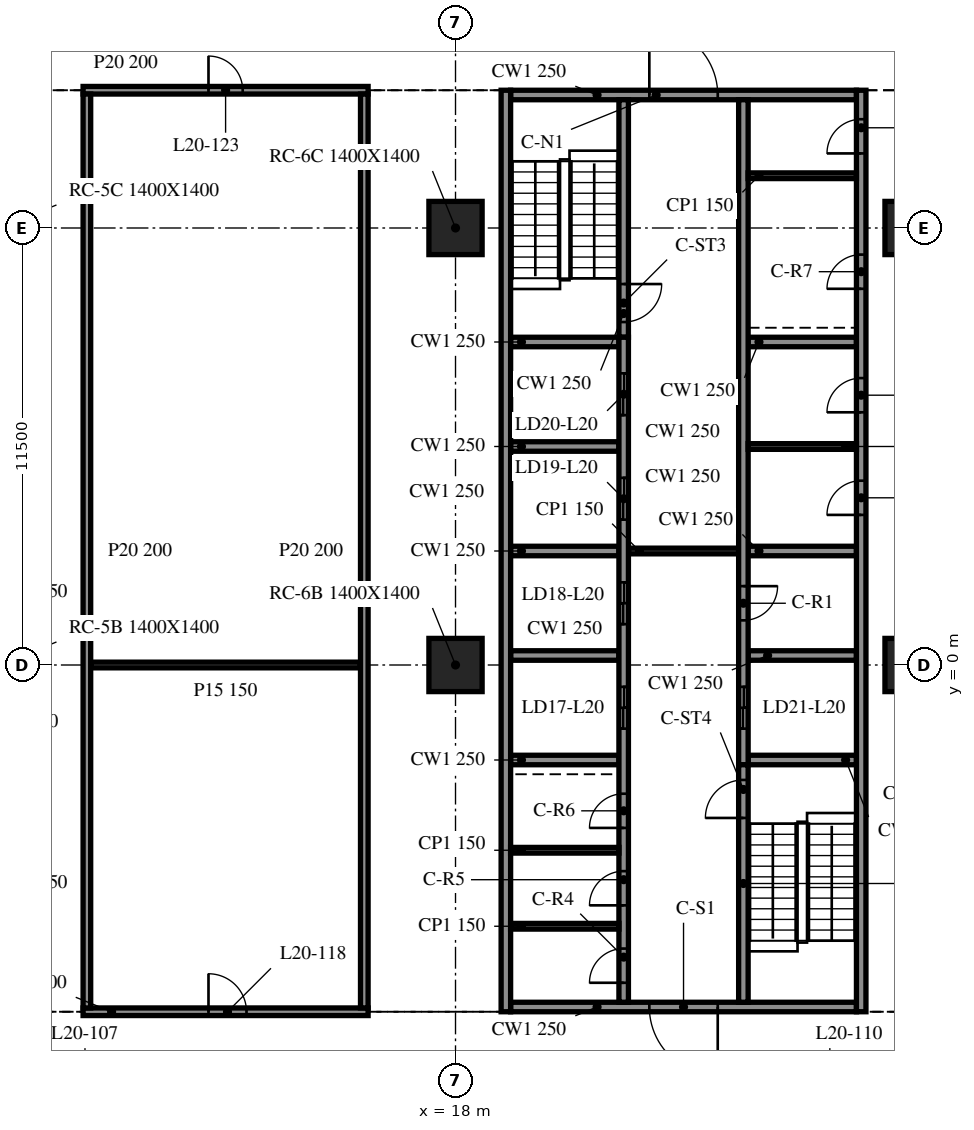
"""IFC4 building model, lengths in metres.
Left out: names, types, materials, properties, quantities, classifications, styles, units other than length and angle.
Written with IfcOpenShell. Run it as: python <this file> out.ifc"""

import sys

from ifc_helpers import new_model, si_unit, direction, frame, frame_2d, origin, origin_2d, place, context, subcontext, project, spatial, rectangle, extrude, element, fill, save


model = new_model("IFC4")
c1 = context("Model", 3, precision=1e-05, world=origin(), true_north=direction((0.0, 1.0)))
c2 = subcontext(c1, "Body", "Model", "MODEL_VIEW")
j1 = project(units=[si_unit("LENGTHUNIT", "METRE"), si_unit("PLANEANGLEUNIT", "RADIAN")], contexts=[c1])
p1 = place(None, origin())
s1 = spatial("IfcSite", under=j1, at=p1, CompositionType="ELEMENT")
p2 = place(p1, origin())
s2 = spatial("IfcBuilding", under=s1, at=p2, CompositionType="ELEMENT")
p3 = place(p2, frame((0.0, 0.0, 88.9)))
s3 = spatial("IfcBuildingStorey", under=s2, at=p3, CompositionType="ELEMENT", Elevation=88.9)
for number, where, z_axis, x_axis in (
    (1, (18.0, 0.0, -0.34), (0.0, 0.0, 1.0), (1.0, 0.0, 0.0)),
    (2, (18.0, 11.5, -0.34), (0.0, 0.0, 1.0), (1.0, 0.0, 0.0)),
    (3, (30.0, 0.0, -0.34), (0.0, 0.0, 1.0), (1.0, 0.0, 0.0)),
    (4, (30.0, 11.5, -0.34), (0.0, 0.0, 1.0), (1.0, 0.0, 0.0)),
):
    element("IfcColumn", number, at=place(p3, frame(where, z_axis=z_axis, x_axis=x_axis)), inside=s3, PredefinedType="COLUMN", context=c2, shape_type="SweptSolid", body=[
        extrude(rectangle(XDim=1.4, YDim=1.4, at=origin_2d()), origin(), (0.0, 0.0, 1.0), 4.1),
    ])
p4 = place(p3, frame((19.325, 15.125, 0.0), z_axis=(0.0, 0.0, 1.0), x_axis=(0.0, -1.0, 0.0)))
e5 = element("IfcWall", 5, at=p4, inside=s3, PredefinedType="SOLIDWALL", context=c2, shape_type="SweptSolid", body=[
    extrude(rectangle(XDim=24.25, YDim=0.25, at=frame_2d((12.125, 0.0))), origin(), (0.0, 0.0, 1.0), 3.76),
])
p5 = place(p3, frame((28.675, -9.125, 0.0), z_axis=(0.0, 0.0, 1.0), x_axis=(0.0, 1.0, 0.0)))
e6 = element("IfcWall", 6, at=p5, inside=s3, PredefinedType="SOLIDWALL", context=c2, shape_type="SweptSolid", body=[
    extrude(rectangle(XDim=24.25, YDim=0.25, at=frame_2d((12.125, 0.0))), origin(), (0.0, 0.0, 1.0), 3.76),
])
p6 = place(p5, frame((13.075, 0.0, 0.0)))
e7 = element("IfcOpeningElement", 7, at=p6, cuts=e6, PredefinedType="OPENING", context=c2, shape_type="SweptSolid", body=[
    extrude(rectangle(XDim=0.9, YDim=2.1, at=frame_2d((0.45, 1.05))), frame((0.0, 0.135, 0.0), z_axis=(0.0, -1.0, 0.0), x_axis=(1.0, 0.0, 0.0)), (0.0, 0.0, 1.0), 0.27),
])
p7 = place(p5, frame((15.775, 0.0, 0.0)))
e8 = element("IfcOpeningElement", 8, at=p7, cuts=e6, PredefinedType="OPENING", context=c2, shape_type="SweptSolid", body=[
    extrude(rectangle(XDim=0.9, YDim=2.1, at=frame_2d((0.45, 1.05))), frame((0.0, 0.135, 0.0), z_axis=(0.0, -1.0, 0.0), x_axis=(1.0, 0.0, 0.0)), (0.0, 0.0, 1.0), 0.27),
])
p8 = place(p5, frame((19.025, 0.0, 0.0)))
e9 = element("IfcOpeningElement", 9, at=p8, cuts=e6, PredefinedType="OPENING", context=c2, shape_type="SweptSolid", body=[
    extrude(rectangle(XDim=0.9, YDim=2.1, at=frame_2d((0.45, 1.05))), frame((0.0, 0.135, 0.0), z_axis=(0.0, -1.0, 0.0), x_axis=(1.0, 0.0, 0.0)), (0.0, 0.0, 1.0), 0.27),
])
p9 = place(p5, frame((22.587, 0.0, 0.0)))
e10 = element("IfcOpeningElement", 10, at=p9, cuts=e6, PredefinedType="OPENING", context=c2, shape_type="SweptSolid", body=[
    extrude(rectangle(XDim=0.9, YDim=2.1, at=frame_2d((0.45, 1.05))), frame((0.0, 0.135, 0.0), z_axis=(0.0, -1.0, 0.0), x_axis=(1.0, 0.0, 0.0)), (0.0, 0.0, 1.0), 0.27),
])
p10 = place(p3, frame((28.55, -9.0, 0.0), z_axis=(0.0, 0.0, 1.0), x_axis=(-1.0, 0.0, 0.0)))
e11 = element("IfcWall", 11, at=p10, inside=s3, PredefinedType="SOLIDWALL", context=c2, shape_type="SweptSolid", body=[
    extrude(rectangle(XDim=9.1, YDim=0.25, at=frame_2d((4.55, 0.0))), origin(), (0.0, 0.0, 1.0), 3.76),
])
p11 = place(p10, frame((3.65, 0.0, 0.0)))
e12 = element("IfcOpeningElement", 12, at=p11, cuts=e11, PredefinedType="OPENING", context=c2, shape_type="SweptSolid", body=[
    extrude(rectangle(XDim=1.8, YDim=2.1, at=frame_2d((0.9, 1.05))), frame((0.0, 0.135, 0.0), z_axis=(0.0, -1.0, 0.0), x_axis=(1.0, 0.0, 0.0)), (0.0, 0.0, 1.0), 0.27),
])
p12 = place(p3, frame((19.45, 15.0, 0.0), z_axis=(0.0, 0.0, 1.0), x_axis=(1.0, 0.0, 0.0)))
e13 = element("IfcWall", 13, at=p12, inside=s3, PredefinedType="SOLIDWALL", context=c2, shape_type="SweptSolid", body=[
    extrude(rectangle(XDim=9.1, YDim=0.25, at=frame_2d((4.55, 0.0))), origin(), (0.0, 0.0, 1.0), 3.76),
])
p13 = place(p12, frame((3.65, 0.0, 0.0)))
e14 = element("IfcOpeningElement", 14, at=p13, cuts=e13, PredefinedType="OPENING", context=c2, shape_type="SweptSolid", body=[
    extrude(rectangle(XDim=1.8, YDim=2.1, at=frame_2d((0.9, 1.05))), frame((0.0, 0.135, 0.0), z_axis=(0.0, -1.0, 0.0), x_axis=(1.0, 0.0, 0.0)), (0.0, 0.0, 1.0), 0.27),
])
p14 = place(p3, frame((22.425, -8.875, 0.0), z_axis=(0.0, 0.0, 1.0), x_axis=(0.0, 1.0, 0.0)))
e15 = element("IfcWall", 15, at=p14, inside=s3, PredefinedType="SOLIDWALL", context=c2, shape_type="SweptSolid", body=[
    extrude(rectangle(XDim=17.5, YDim=0.25, at=frame_2d((8.75, 0.0))), origin(), (0.0, 0.0, 1.0), 3.76),
])
p15 = place(p14, frame((7.2, 0.0, 0.0)))
e16 = element("IfcOpeningElement", 16, at=p15, cuts=e15, PredefinedType="OPENING", context=c2, shape_type="SweptSolid", body=[
    extrude(rectangle(XDim=1.1, YDim=2.1, at=frame_2d((0.55, 1.05))), frame((0.0, 0.135, 0.0), z_axis=(0.0, -1.0, 0.0), x_axis=(1.0, 0.0, 0.0)), (0.0, 0.0, 1.0), 0.27),
])
p16 = place(p14, frame((9.95, 0.0, 0.0)))
e17 = element("IfcOpeningElement", 17, at=p16, cuts=e15, PredefinedType="OPENING", context=c2, shape_type="SweptSolid", body=[
    extrude(rectangle(XDim=1.1, YDim=2.1, at=frame_2d((0.55, 1.05))), frame((0.0, 0.135, 0.0), z_axis=(0.0, -1.0, 0.0), x_axis=(1.0, 0.0, 0.0)), (0.0, 0.0, 1.0), 0.27),
])
p17 = place(p14, frame((12.7, 0.0, 0.0)))
e18 = element("IfcOpeningElement", 18, at=p17, cuts=e15, PredefinedType="OPENING", context=c2, shape_type="SweptSolid", body=[
    extrude(rectangle(XDim=1.1, YDim=2.1, at=frame_2d((0.55, 1.05))), frame((0.0, 0.135, 0.0), z_axis=(0.0, -1.0, 0.0), x_axis=(1.0, 0.0, 0.0)), (0.0, 0.0, 1.0), 0.27),
])
p18 = place(p14, frame((15.45, 0.0, 0.0)))
e19 = element("IfcOpeningElement", 19, at=p18, cuts=e15, PredefinedType="OPENING", context=c2, shape_type="SweptSolid", body=[
    extrude(rectangle(XDim=1.1, YDim=2.1, at=frame_2d((0.55, 1.05))), frame((0.0, 0.135, 0.0), z_axis=(0.0, -1.0, 0.0), x_axis=(1.0, 0.0, 0.0)), (0.0, 0.0, 1.0), 0.27),
])
p19 = place(p14, frame((0.512, 0.0, 0.0)))
e20 = element("IfcOpeningElement", 20, at=p19, cuts=e15, PredefinedType="OPENING", context=c2, shape_type="SweptSolid", body=[
    extrude(rectangle(XDim=0.9, YDim=2.1, at=frame_2d((0.45, 1.05))), frame((0.0, 0.135, 0.0), z_axis=(0.0, -1.0, 0.0), x_axis=(1.0, 0.0, 0.0)), (0.0, 0.0, 1.0), 0.27),
])
p20 = place(p14, frame((2.55, 0.0, 0.0)))
e21 = element("IfcOpeningElement", 21, at=p20, cuts=e15, PredefinedType="OPENING", context=c2, shape_type="SweptSolid", body=[
    extrude(rectangle(XDim=0.9, YDim=2.1, at=frame_2d((0.45, 1.05))), frame((0.0, 0.135, 0.0), z_axis=(0.0, -1.0, 0.0), x_axis=(1.0, 0.0, 0.0)), (0.0, 0.0, 1.0), 0.27),
])
p21 = place(p14, frame((4.587, 0.0, 0.0)))
e22 = element("IfcOpeningElement", 22, at=p21, cuts=e15, PredefinedType="OPENING", context=c2, shape_type="SweptSolid", body=[
    extrude(rectangle(XDim=0.9, YDim=2.1, at=frame_2d((0.45, 1.05))), frame((0.0, 0.135, 0.0), z_axis=(0.0, -1.0, 0.0), x_axis=(1.0, 0.0, 0.0)), (0.0, 0.0, 1.0), 0.27),
])
p22 = place(p3, frame((22.425, 14.875, 0.0), z_axis=(0.0, 0.0, 1.0), x_axis=(0.0, -1.0, 0.0)))
e23 = element("IfcWall", 23, at=p22, inside=s3, PredefinedType="SOLIDWALL", context=c2, shape_type="SweptSolid", body=[
    extrude(rectangle(XDim=6.25, YDim=0.25, at=frame_2d((3.125, 0.0))), origin(), (0.0, 0.0, 1.0), 3.76),
])
p23 = place(p22, frame((4.85, 0.0, 0.0)))
e24 = element("IfcOpeningElement", 24, at=p23, cuts=e23, PredefinedType="OPENING", context=c2, shape_type="SweptSolid", body=[
    extrude(rectangle(XDim=1.0, YDim=2.1, at=frame_2d((0.5, 1.05))), frame((0.0, 0.135, 0.0), z_axis=(0.0, -1.0, 0.0), x_axis=(1.0, 0.0, 0.0)), (0.0, 0.0, 1.0), 0.27),
])
p24 = place(p3, frame((25.575, -8.875, 0.0), z_axis=(0.0, 0.0, 1.0), x_axis=(0.0, 1.0, 0.0)))
e25 = element("IfcWall", 25, at=p24, inside=s3, PredefinedType="SOLIDWALL", context=c2, shape_type="SweptSolid", body=[
    extrude(rectangle(XDim=6.25, YDim=0.25, at=frame_2d((3.125, 0.0))), origin(), (0.0, 0.0, 1.0), 3.76),
])
p25 = place(p24, frame((4.85, 0.0, 0.0)))
e26 = element("IfcOpeningElement", 26, at=p25, cuts=e25, PredefinedType="OPENING", context=c2, shape_type="SweptSolid", body=[
    extrude(rectangle(XDim=1.0, YDim=2.1, at=frame_2d((0.5, 1.05))), frame((0.0, 0.135, 0.0), z_axis=(0.0, -1.0, 0.0), x_axis=(1.0, 0.0, 0.0)), (0.0, 0.0, 1.0), 0.27),
])
p26 = place(p3, frame((25.575, 14.875, 0.0), z_axis=(0.0, 0.0, 1.0), x_axis=(0.0, -1.0, 0.0)))
e27 = element("IfcWall", 27, at=p26, inside=s3, PredefinedType="SOLIDWALL", context=c2, shape_type="SweptSolid", body=[
    extrude(rectangle(XDim=17.5, YDim=0.25, at=frame_2d((8.75, 0.0))), origin(), (0.0, 0.0, 1.0), 3.76),
])
p27 = place(p26, frame((15.45, 0.0, 0.0)))
e28 = element("IfcOpeningElement", 28, at=p27, cuts=e27, PredefinedType="OPENING", context=c2, shape_type="SweptSolid", body=[
    extrude(rectangle(XDim=1.1, YDim=2.1, at=frame_2d((0.55, 1.05))), frame((0.0, 0.135, 0.0), z_axis=(0.0, -1.0, 0.0), x_axis=(1.0, 0.0, 0.0)), (0.0, 0.0, 1.0), 0.27),
])
p28 = place(p26, frame((12.8, 0.0, 0.0)))
e29 = element("IfcOpeningElement", 29, at=p28, cuts=e27, PredefinedType="OPENING", context=c2, shape_type="SweptSolid", body=[
    extrude(rectangle(XDim=0.9, YDim=2.1, at=frame_2d((0.45, 1.05))), frame((0.0, 0.135, 0.0), z_axis=(0.0, -1.0, 0.0), x_axis=(1.0, 0.0, 0.0)), (0.0, 0.0, 1.0), 0.27),
])
for number, where, z_axis, x_axis in (
    (30, (19.45, -2.5, 0.0), (0.0, 0.0, 1.0), (1.0, 0.0, 0.0)),
    (31, (19.45, 0.25, 0.0), (0.0, 0.0, 1.0), (1.0, 0.0, 0.0)),
    (32, (19.45, 3.0, 0.0), (0.0, 0.0, 1.0), (1.0, 0.0, 0.0)),
    (33, (19.45, 5.75, 0.0), (0.0, 0.0, 1.0), (1.0, 0.0, 0.0)),
    (34, (19.45, 8.5, 0.0), (0.0, 0.0, 1.0), (1.0, 0.0, 0.0)),
    (35, (25.7, -2.5, 0.0), (0.0, 0.0, 1.0), (1.0, 0.0, 0.0)),
    (36, (25.7, 0.25, 0.0), (0.0, 0.0, 1.0), (1.0, 0.0, 0.0)),
    (37, (25.7, 3.0, 0.0), (0.0, 0.0, 1.0), (1.0, 0.0, 0.0)),
    (38, (25.7, 8.5, 0.0), (0.0, 0.0, 1.0), (1.0, 0.0, 0.0)),
):
    element("IfcWall", number, at=place(p3, frame(where, z_axis=z_axis, x_axis=x_axis)), inside=s3, PredefinedType="SOLIDWALL", context=c2, shape_type="SweptSolid", body=[
        extrude(rectangle(XDim=2.85, YDim=0.25, at=frame_2d((1.425, 0.0))), origin(), (0.0, 0.0, 1.0), 3.76),
    ])
p29 = place(p3, frame((22.55, 3.0, 0.0), z_axis=(0.0, 0.0, 1.0), x_axis=(1.0, 0.0, 0.0)))
e39 = element("IfcWall", 39, at=p29, inside=s3, PredefinedType="PARTITIONING", context=c2, shape_type="SweptSolid", body=[
    extrude(rectangle(XDim=2.9, YDim=0.15, at=frame_2d((1.45, 0.0))), origin(), (0.0, 0.0, 1.0), 3.76),
])
for number, where, z_axis, x_axis in (
    (40, (25.7, 5.75, 0.0), (0.0, 0.0, 1.0), (1.0, 0.0, 0.0)),
    (41, (19.45, -6.875, 0.0), (0.0, 0.0, 1.0), (1.0, 0.0, 0.0)),
    (42, (19.45, -4.875, 0.0), (0.0, 0.0, 1.0), (1.0, 0.0, 0.0)),
    (43, (25.7, 12.875, 0.0), (0.0, 0.0, 1.0), (1.0, 0.0, 0.0)),
):
    element("IfcWall", number, at=place(p3, frame(where, z_axis=z_axis, x_axis=x_axis)), inside=s3, PredefinedType="PARTITIONING", context=c2, shape_type="SweptSolid", body=[
        extrude(rectangle(XDim=2.85, YDim=0.15, at=frame_2d((1.425, 0.0))), origin(), (0.0, 0.0, 1.0), 3.76),
    ])
p30 = place(p3, frame((8.2, -9.125, 0.0), z_axis=(0.0, 0.0, 1.0), x_axis=(1.0, 0.0, 0.0)))
e44 = element("IfcWall", 44, at=p30, inside=s3, PredefinedType="PARTITIONING", context=c2, shape_type="SweptSolid", body=[
    extrude(rectangle(XDim=7.5, YDim=0.2, at=frame_2d((3.75, 0.0))), origin(), (0.0, 0.0, 1.0), 3.76),
])
p31 = place(p30, frame((3.3, 0.0, 0.0)))
e45 = element("IfcOpeningElement", 45, at=p31, cuts=e44, PredefinedType="OPENING", context=c2, shape_type="SweptSolid", body=[
    extrude(rectangle(XDim=1.0, YDim=2.1, at=frame_2d((0.5, 1.05))), frame((0.0, 0.11, 0.0), z_axis=(0.0, -1.0, 0.0), x_axis=(1.0, 0.0, 0.0)), (0.0, 0.0, 1.0), 0.22),
])
p32 = place(p3, frame((8.4, 0.0, 0.0), z_axis=(0.0, 0.0, 1.0), x_axis=(1.0, 0.0, 0.0)))
e46 = element("IfcWall", 46, at=p32, inside=s3, PredefinedType="PARTITIONING", context=c2, shape_type="SweptSolid", body=[
    extrude(rectangle(XDim=7.1, YDim=0.15, at=frame_2d((3.55, 0.0))), origin(), (0.0, 0.0, 1.0), 3.76),
])
p33 = place(p3, frame((8.2, 15.125, 0.0), z_axis=(0.0, 0.0, 1.0), x_axis=(1.0, 0.0, 0.0)))
e47 = element("IfcWall", 47, at=p33, inside=s3, PredefinedType="PARTITIONING", context=c2, shape_type="SweptSolid", body=[
    extrude(rectangle(XDim=7.5, YDim=0.2, at=frame_2d((3.75, 0.0))), origin(), (0.0, 0.0, 1.0), 3.76),
])
p34 = place(p33, frame((3.3, 0.0, 0.0)))
e48 = element("IfcOpeningElement", 48, at=p34, cuts=e47, PredefinedType="OPENING", context=c2, shape_type="SweptSolid", body=[
    extrude(rectangle(XDim=0.9, YDim=2.1, at=frame_2d((0.45, 1.05))), frame((0.0, 0.11, 0.0), z_axis=(0.0, -1.0, 0.0), x_axis=(1.0, 0.0, 0.0)), (0.0, 0.0, 1.0), 0.22),
])
for number, where, z_axis, x_axis in (
    (49, (8.3, -9.025, 0.0), (0.0, 0.0, 1.0), (0.0, 1.0, 0.0)),
    (50, (15.6, -9.025, 0.0), (0.0, 0.0, 1.0), (0.0, 1.0, 0.0)),
):
    element("IfcWall", number, at=place(p3, frame(where, z_axis=z_axis, x_axis=x_axis)), inside=s3, PredefinedType="PARTITIONING", context=c2, shape_type="SweptSolid", body=[
        extrude(rectangle(XDim=24.05, YDim=0.2, at=frame_2d((12.025, 0.0))), origin(), (0.0, 0.0, 1.0), 3.76),
    ])
p35 = place(p11, origin())
e51 = element("IfcDoor", 51, at=p35, inside=s3, OperationType="DOUBLE_DOOR_SINGLE_SWING", PredefinedType="DOOR", context=c2, shape_type="SweptSolid", body=[
    extrude(rectangle(XDim=1.8, YDim=2.1, at=frame_2d((0.9, 1.05))), frame((0.0, 0.025, 0.0), z_axis=(0.0, -1.0, 0.0), x_axis=(1.0, 0.0, 0.0)), (0.0, 0.0, 1.0), 0.05),
])
fill(e12, e51)
p36 = place(p13, origin())
e52 = element("IfcDoor", 52, at=p36, inside=s3, OperationType="DOUBLE_DOOR_SINGLE_SWING", PredefinedType="DOOR", context=c2, shape_type="SweptSolid", body=[
    extrude(rectangle(XDim=1.8, YDim=2.1, at=frame_2d((0.9, 1.05))), frame((0.0, 0.025, 0.0), z_axis=(0.0, -1.0, 0.0), x_axis=(1.0, 0.0, 0.0)), (0.0, 0.0, 1.0), 0.05),
])
fill(e14, e52)
p37 = place(p27, origin())
e53 = element("IfcDoor", 53, at=p37, inside=s3, OperationType="DOUBLE_DOOR_SLIDING", PredefinedType="DOOR", context=c2, shape_type="SweptSolid", body=[
    extrude(rectangle(XDim=1.1, YDim=2.1, at=frame_2d((0.55, 1.05))), frame((0.0, 0.025, 0.0), z_axis=(0.0, -1.0, 0.0), x_axis=(1.0, 0.0, 0.0)), (0.0, 0.0, 1.0), 0.05),
])
fill(e28, e53)
p38 = place(p15, origin())
e54 = element("IfcDoor", 54, at=p38, inside=s3, OperationType="DOUBLE_DOOR_SLIDING", PredefinedType="DOOR", context=c2, shape_type="SweptSolid", body=[
    extrude(rectangle(XDim=1.1, YDim=2.1, at=frame_2d((0.55, 1.05))), frame((0.0, 0.025, 0.0), z_axis=(0.0, -1.0, 0.0), x_axis=(1.0, 0.0, 0.0)), (0.0, 0.0, 1.0), 0.05),
])
fill(e16, e54)
p39 = place(p16, origin())
e55 = element("IfcDoor", 55, at=p39, inside=s3, OperationType="DOUBLE_DOOR_SLIDING", PredefinedType="DOOR", context=c2, shape_type="SweptSolid", body=[
    extrude(rectangle(XDim=1.1, YDim=2.1, at=frame_2d((0.55, 1.05))), frame((0.0, 0.025, 0.0), z_axis=(0.0, -1.0, 0.0), x_axis=(1.0, 0.0, 0.0)), (0.0, 0.0, 1.0), 0.05),
])
fill(e17, e55)
p40 = place(p17, origin())
e56 = element("IfcDoor", 56, at=p40, inside=s3, OperationType="DOUBLE_DOOR_SLIDING", PredefinedType="DOOR", context=c2, shape_type="SweptSolid", body=[
    extrude(rectangle(XDim=1.1, YDim=2.1, at=frame_2d((0.55, 1.05))), frame((0.0, 0.025, 0.0), z_axis=(0.0, -1.0, 0.0), x_axis=(1.0, 0.0, 0.0)), (0.0, 0.0, 1.0), 0.05),
])
fill(e18, e56)
p41 = place(p18, origin())
e57 = element("IfcDoor", 57, at=p41, inside=s3, OperationType="DOUBLE_DOOR_SLIDING", PredefinedType="DOOR", context=c2, shape_type="SweptSolid", body=[
    extrude(rectangle(XDim=1.1, YDim=2.1, at=frame_2d((0.55, 1.05))), frame((0.0, 0.025, 0.0), z_axis=(0.0, -1.0, 0.0), x_axis=(1.0, 0.0, 0.0)), (0.0, 0.0, 1.0), 0.05),
])
fill(e19, e57)
p42 = place(p28, origin())
e58 = element("IfcDoor", 58, at=p42, inside=s3, OperationType="SINGLE_SWING_LEFT", PredefinedType="DOOR", context=c2, shape_type="SweptSolid", body=[
    extrude(rectangle(XDim=0.9, YDim=2.1, at=frame_2d((0.45, 1.05))), frame((0.0, 0.025, 0.0), z_axis=(0.0, -1.0, 0.0), x_axis=(1.0, 0.0, 0.0)), (0.0, 0.0, 1.0), 0.05),
])
fill(e29, e58)
p43 = place(p6, origin())
e59 = element("IfcDoor", 59, at=p43, inside=s3, OperationType="SINGLE_SWING_RIGHT", PredefinedType="DOOR", context=c2, shape_type="SweptSolid", body=[
    extrude(rectangle(XDim=0.9, YDim=2.1, at=frame_2d((0.45, 1.05))), frame((0.0, 0.025, 0.0), z_axis=(0.0, -1.0, 0.0), x_axis=(1.0, 0.0, 0.0)), (0.0, 0.0, 1.0), 0.05),
])
fill(e7, e59)
p44 = place(p7, origin())
e60 = element("IfcDoor", 60, at=p44, inside=s3, OperationType="SINGLE_SWING_LEFT", PredefinedType="DOOR", context=c2, shape_type="SweptSolid", body=[
    extrude(rectangle(XDim=0.9, YDim=2.1, at=frame_2d((0.45, 1.05))), frame((0.0, 0.025, 0.0), z_axis=(0.0, -1.0, 0.0), x_axis=(1.0, 0.0, 0.0)), (0.0, 0.0, 1.0), 0.05),
])
fill(e8, e60)
p45 = place(p19, origin())
e61 = element("IfcDoor", 61, at=p45, inside=s3, OperationType="SINGLE_SWING_RIGHT", PredefinedType="DOOR", context=c2, shape_type="SweptSolid", body=[
    extrude(rectangle(XDim=0.9, YDim=2.1, at=frame_2d((0.45, 1.05))), frame((0.0, 0.025, 0.0), z_axis=(0.0, -1.0, 0.0), x_axis=(1.0, 0.0, 0.0)), (0.0, 0.0, 1.0), 0.05),
])
fill(e20, e61)
p46 = place(p20, origin())
e62 = element("IfcDoor", 62, at=p46, inside=s3, OperationType="SINGLE_SWING_LEFT", PredefinedType="DOOR", context=c2, shape_type="SweptSolid", body=[
    extrude(rectangle(XDim=0.9, YDim=2.1, at=frame_2d((0.45, 1.05))), frame((0.0, 0.025, 0.0), z_axis=(0.0, -1.0, 0.0), x_axis=(1.0, 0.0, 0.0)), (0.0, 0.0, 1.0), 0.05),
])
fill(e21, e62)
p47 = place(p21, origin())
e63 = element("IfcDoor", 63, at=p47, inside=s3, OperationType="SINGLE_SWING_RIGHT", PredefinedType="DOOR", context=c2, shape_type="SweptSolid", body=[
    extrude(rectangle(XDim=0.9, YDim=2.1, at=frame_2d((0.45, 1.05))), frame((0.0, 0.025, 0.0), z_axis=(0.0, -1.0, 0.0), x_axis=(1.0, 0.0, 0.0)), (0.0, 0.0, 1.0), 0.05),
])
fill(e22, e63)
p48 = place(p8, origin())
e64 = element("IfcDoor", 64, at=p48, inside=s3, OperationType="SINGLE_SWING_LEFT", PredefinedType="DOOR", context=c2, shape_type="SweptSolid", body=[
    extrude(rectangle(XDim=0.9, YDim=2.1, at=frame_2d((0.45, 1.05))), frame((0.0, 0.025, 0.0), z_axis=(0.0, -1.0, 0.0), x_axis=(1.0, 0.0, 0.0)), (0.0, 0.0, 1.0), 0.05),
])
fill(e9, e64)
p49 = place(p9, origin())
e65 = element("IfcDoor", 65, at=p49, inside=s3, OperationType="SINGLE_SWING_RIGHT", PredefinedType="DOOR", context=c2, shape_type="SweptSolid", body=[
    extrude(rectangle(XDim=0.9, YDim=2.1, at=frame_2d((0.45, 1.05))), frame((0.0, 0.025, 0.0), z_axis=(0.0, -1.0, 0.0), x_axis=(1.0, 0.0, 0.0)), (0.0, 0.0, 1.0), 0.05),
])
fill(e10, e65)
p50 = place(p23, origin())
e66 = element("IfcDoor", 66, at=p50, inside=s3, OperationType="SINGLE_SWING_LEFT", PredefinedType="DOOR", context=c2, shape_type="SweptSolid", body=[
    extrude(rectangle(XDim=1.0, YDim=2.1, at=frame_2d((0.5, 1.05))), frame((0.0, 0.025, 0.0), z_axis=(0.0, -1.0, 0.0), x_axis=(1.0, 0.0, 0.0)), (0.0, 0.0, 1.0), 0.05),
])
fill(e24, e66)
p51 = place(p25, origin())
e67 = element("IfcDoor", 67, at=p51, inside=s3, OperationType="SINGLE_SWING_RIGHT", PredefinedType="DOOR", context=c2, shape_type="SweptSolid", body=[
    extrude(rectangle(XDim=1.0, YDim=2.1, at=frame_2d((0.5, 1.05))), frame((0.0, 0.025, 0.0), z_axis=(0.0, -1.0, 0.0), x_axis=(1.0, 0.0, 0.0)), (0.0, 0.0, 1.0), 0.05),
])
fill(e26, e67)
p52 = place(p31, origin())
e68 = element("IfcDoor", 68, at=p52, inside=s3, OperationType="SINGLE_SWING_RIGHT", PredefinedType="DOOR", context=c2, shape_type="SweptSolid", body=[
    extrude(rectangle(XDim=1.0, YDim=2.1, at=frame_2d((0.5, 1.05))), frame((0.0, 0.025, 0.0), z_axis=(0.0, -1.0, 0.0), x_axis=(1.0, 0.0, 0.0)), (0.0, 0.0, 1.0), 0.05),
])
fill(e45, e68)
p53 = place(p34, origin())
e69 = element("IfcDoor", 69, at=p53, inside=s3, OperationType="SINGLE_SWING_LEFT", PredefinedType="DOOR", context=c2, shape_type="SweptSolid", body=[
    extrude(rectangle(XDim=0.9, YDim=2.1, at=frame_2d((0.45, 1.05))), frame((0.0, 0.025, 0.0), z_axis=(0.0, -1.0, 0.0), x_axis=(1.0, 0.0, 0.0)), (0.0, 0.0, 1.0), 0.05),
])
fill(e48, e69)
save(model, sys.argv[1])
